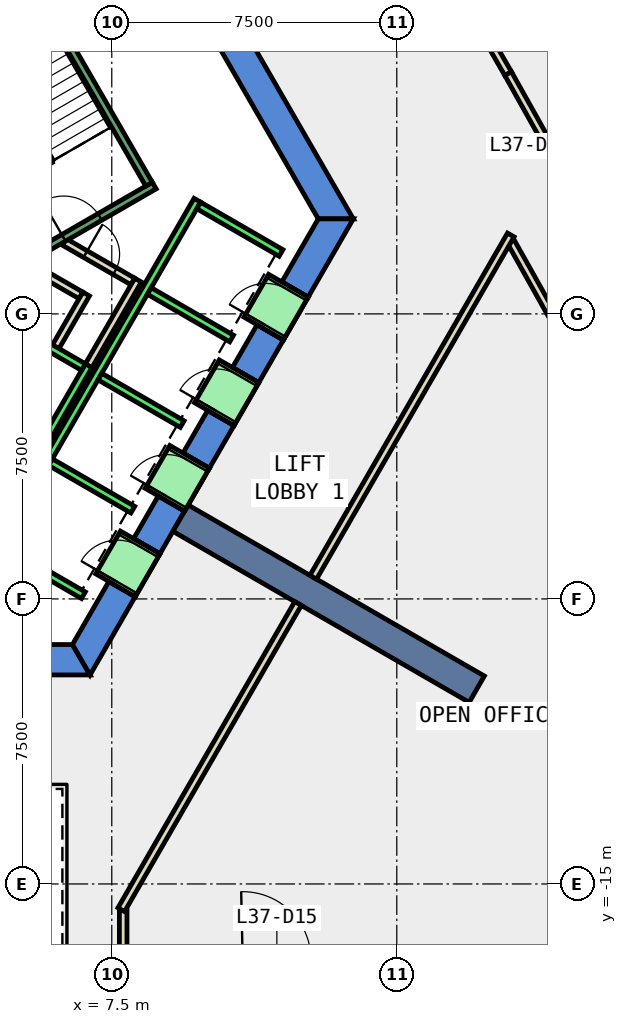
"""IFC4 building model, lengths in metres.
Left out: names, types, materials, properties, quantities, classifications, styles, units other than length and angle.
Written with IfcOpenShell. Run it as: python <this file> out.ifc"""

import sys

from ifc_helpers import new_model, si_unit, direction, frame, frame_2d, origin, place, context, subcontext, project, spatial, polyline, rectangle, outline, extrude, element, fill, save


model = new_model("IFC4")
c1 = context("Model", 3, precision=1e-05, world=origin(), true_north=direction((0.0, 1.0)))
c2 = subcontext(c1, "Body", "Model", "MODEL_VIEW")
j1 = project(units=[si_unit("LENGTHUNIT", "METRE"), si_unit("PLANEANGLEUNIT", "RADIAN")], contexts=[c1])
p1 = place(None, origin())
s1 = spatial("IfcSite", under=j1, at=p1, CompositionType="ELEMENT")
p2 = place(p1, origin())
s2 = spatial("IfcBuilding", under=s1, at=p2, CompositionType="ELEMENT")
p3 = place(p2, frame((0.0, 0.0, 167.6)))
s3 = spatial("IfcBuildingStorey", under=s2, at=p3, CompositionType="ELEMENT", Elevation=167.6)
p4 = place(p3, frame((0.0, 0.0, -0.4)))
e1 = element("IfcWall", 1, at=p4, inside=s3, PredefinedType="SHEAR", context=c2, shape_type="SweptSolid", body=[
    extrude(outline(polyline([(8.517, 11.748), (7.824, 11.348), (12.933, 2.5), (13.856, 2.5), (8.517, 11.748)])), origin(), (0.0, 0.0, 1.0), 4.2),
])
p5 = place(p3, frame((0.0, 0.0, -0.4)))
e2 = element("IfcWall", 2, at=p5, inside=s3, PredefinedType="SHEAR", context=c2, shape_type="SweptSolid", body=[
    extrude(outline(polyline([(5.75, -8.7), (5.75, -9.5), (6.928, -9.5), (6.466, -8.7), (5.75, -8.7)])), origin(), (0.0, 0.0, 1.0), 4.2),
])
p6 = place(p3, frame((0.0, 0.0, -0.4)))
e3 = element("IfcWall", 3, at=p6, inside=s3, PredefinedType="SHEAR", context=c2, shape_type="SweptSolid", body=[
    extrude(outline(polyline([(8.117, -7.44), (7.424, -7.04), (6.466, -8.7), (6.928, -9.5), (8.117, -7.44)])), origin(), (0.0, 0.0, 1.0), 4.2),
])
p7 = place(p3, frame((0.0, 0.0, -0.4)))
e4 = element("IfcWall", 4, at=p7, inside=s3, PredefinedType="SHEAR", context=c2, shape_type="SweptSolid", body=[
    extrude(outline(polyline([(9.417, -5.189), (8.724, -4.789), (8.075, -5.914), (8.767, -6.314), (9.417, -5.189)])), origin(), (0.0, 0.0, 1.0), 4.2),
])
p8 = place(p3, frame((0.0, 0.0, -0.4)))
e5 = element("IfcWall", 5, at=p8, inside=s3, PredefinedType="SHEAR", context=c2, shape_type="SweptSolid", body=[
    extrude(outline(polyline([(10.717, -2.937), (10.025, -2.537), (9.374, -3.663), (10.067, -4.063), (10.717, -2.937)])), origin(), (0.0, 0.0, 1.0), 4.2),
])
p9 = place(p3, frame((0.0, 0.0, -0.4)))
e6 = element("IfcWall", 6, at=p9, inside=s3, PredefinedType="SHEAR", context=c2, shape_type="SweptSolid", body=[
    extrude(outline(polyline([(12.017, -0.686), (11.324, -0.286), (10.675, -1.411), (11.367, -1.811), (12.017, -0.686)])), origin(), (0.0, 0.0, 1.0), 4.2),
])
p10 = place(p3, frame((0.0, 0.0, -0.4)))
e7 = element("IfcWall", 7, at=p10, inside=s3, PredefinedType="SHEAR", context=c2, shape_type="SweptSolid", body=[
    extrude(outline(polyline([(11.974, 0.84), (12.667, 0.44), (13.856, 2.5), (12.933, 2.5), (11.974, 0.84)])), origin(), (0.0, 0.0, 1.0), 4.2),
])
p11 = place(p3, frame((0.0, 0.0, 3.6)))
e8 = element("IfcWall", 8, at=p11, inside=s3, PredefinedType="SHEAR", context=c2, shape_type="SweptSolid", body=[
    extrude(outline(polyline([(8.767, -6.314), (8.075, -5.914), (7.424, -7.04), (8.117, -7.44), (8.767, -6.314)])), origin(), (0.0, 0.0, 1.0), 0.2),
])
p12 = place(p3, frame((0.0, 0.0, 3.6)))
e9 = element("IfcWall", 9, at=p12, inside=s3, PredefinedType="SHEAR", context=c2, shape_type="SweptSolid", body=[
    extrude(outline(polyline([(10.067, -4.063), (9.374, -3.663), (8.724, -4.789), (9.417, -5.189), (10.067, -4.063)])), origin(), (0.0, 0.0, 1.0), 0.2),
])
p13 = place(p3, frame((0.0, 0.0, 3.6)))
e10 = element("IfcWall", 10, at=p13, inside=s3, PredefinedType="SHEAR", context=c2, shape_type="SweptSolid", body=[
    extrude(outline(polyline([(11.367, -1.811), (10.675, -1.411), (10.025, -2.537), (10.717, -2.937), (11.367, -1.811)])), origin(), (0.0, 0.0, 1.0), 0.2),
])
p14 = place(p3, frame((0.0, 0.0, 3.6)))
e11 = element("IfcWall", 11, at=p14, inside=s3, PredefinedType="SHEAR", context=c2, shape_type="SweptSolid", body=[
    extrude(outline(polyline([(12.667, 0.44), (11.974, 0.84), (11.324, -0.286), (12.017, -0.686), (12.667, 0.44)])), origin(), (0.0, 0.0, 1.0), 0.2),
])
p15 = place(p3, frame((9.31, -5.375, -0.4), z_axis=(0.0, 0.0, 1.0), x_axis=(0.866017533419, -0.500013631625, 0.0)))
e12 = element("IfcWall", 12, at=p15, inside=s3, PredefinedType="SHEAR", context=c2, shape_type="SweptSolid", body=[
    extrude(rectangle(XDim=9.0, YDim=0.8, at=frame_2d((4.5, 0.0))), origin(), (0.0, 0.0, 1.0), 4.2),
])
p16 = place(p3, frame((15.987, -16.893, 0.0), z_axis=(0.0, 0.0, 1.0), x_axis=(0.999316060953, 0.036978511606, 0.0)))
e13 = element("IfcWall", 13, at=p16, inside=s3, PredefinedType="PARTITIONING", context=c2, shape_type="SweptSolid", body=[
    extrude(rectangle(XDim=7.355, YDim=0.2, at=frame_2d((3.677, 0.0))), origin(), (0.0, 0.0, 1.0), 3.8),
])
p17 = place(p3, frame((19.506, -0.785, 0.0), z_axis=(0.0, 0.0, 1.0), x_axis=(-0.489049603292, 0.872255974769, 0.0)))
e14 = element("IfcWall", 14, at=p17, inside=s3, PredefinedType="PARTITIONING", context=c2, shape_type="SweptSolid", body=[
    extrude(rectangle(XDim=3.082, YDim=0.2, at=frame_2d((1.541, 0.0))), origin(), (0.0, 0.0, 1.0), 3.8),
])
p18 = place(p3, frame((16.222, 9.28, 0.0), z_axis=(0.0, 0.0, 1.0), x_axis=(0.499920397431, -0.866071357471, 0.0)))
e15 = element("IfcWall", 15, at=p18, inside=s3, PredefinedType="PARTITIONING", context=c2, shape_type="SweptSolid", body=[
    extrude(rectangle(XDim=3.417, YDim=0.2, at=frame_2d((1.708, 0.0))), origin(), (0.0, 0.0, 1.0), 3.8),
])
p19 = place(p3, frame((17.93, 6.321, 0.0), z_axis=(0.0, 0.0, 1.0), x_axis=(0.489044053781, -0.872259086202, 0.0)))
e16 = element("IfcWall", 16, at=p19, inside=s3, PredefinedType="PARTITIONING", context=c2, shape_type="SweptSolid", body=[
    extrude(rectangle(XDim=6.983, YDim=0.2, at=frame_2d((3.492, 0.0))), origin(), (0.0, 0.0, 1.0), 3.8),
])
p20 = place(p19, frame((2.991, 0.0, 0.0)))
e17 = element("IfcOpeningElement", 17, at=p20, cuts=e16, PredefinedType="OPENING", context=c2, shape_type="SweptSolid", body=[
    extrude(rectangle(XDim=1.0, YDim=2.1, at=frame_2d((0.5, 1.05))), frame((0.0, 0.11, 0.0), z_axis=(0.0, -1.0, 0.0), x_axis=(1.0, 0.0, 0.0)), (0.0, 0.0, 1.0), 0.22),
])
p21 = place(p3, frame((5.499, 1.172, 0.0), z_axis=(0.0, 0.0, 1.0), x_axis=(0.866333505267, -0.499465972466, 0.0)))
e18 = element("IfcWall", 18, at=p21, inside=s3, PredefinedType="PARTITIONING", context=c2, shape_type="SweptSolid", body=[
    extrude(rectangle(XDim=1.374, YDim=0.2, at=frame_2d((0.687, 0.0))), origin(), (0.0, 0.0, 1.0), 3.8),
])
p22 = place(p3, frame((6.826, 0.522, 0.0), z_axis=(0.0, 0.0, 1.0), x_axis=(-0.500016722714, -0.866015748706, 0.0)))
e19 = element("IfcWall", 19, at=p22, inside=s3, PredefinedType="PARTITIONING", context=c2, shape_type="SweptSolid", body=[
    extrude(rectangle(XDim=1.7, YDim=0.2, at=frame_2d((0.85, 0.0))), origin(), (0.0, 0.0, 1.0), 3.8),
])
p23 = place(p3, frame((6.25, 1.894, 0.0), z_axis=(0.0, 0.0, 1.0), x_axis=(0.866043184279, -0.499969202016, 0.0)))
e20 = element("IfcWall", 20, at=p23, inside=s3, PredefinedType="PARTITIONING", context=c2, shape_type="SweptSolid", body=[
    extrude(rectangle(XDim=2.084, YDim=0.2, at=frame_2d((1.042, 0.0))), origin(), (0.0, 0.0, 1.0), 3.8),
])
p24 = place(p23, frame((0.642, 0.0, 0.0)))
e21 = element("IfcOpeningElement", 21, at=p24, cuts=e20, PredefinedType="OPENING", context=c2, shape_type="SweptSolid", body=[
    extrude(rectangle(XDim=0.9, YDim=2.1, at=frame_2d((0.45, 1.05))), frame((0.0, 0.11, 0.0), z_axis=(0.0, -1.0, 0.0), x_axis=(1.0, 0.0, 0.0)), (0.0, 0.0, 1.0), 0.22),
])
p25 = place(p3, frame((8.192, 0.888, 0.0), z_axis=(0.0, 0.0, 1.0), x_axis=(-0.499940625693, -0.866059680843, 0.0)))
e22 = element("IfcWall", 22, at=p25, inside=s3, PredefinedType="PARTITIONING", context=c2, shape_type="SweptSolid", body=[
    extrude(rectangle(XDim=2.68, YDim=0.2, at=frame_2d((1.34, 0.0))), origin(), (0.0, 0.0, 1.0), 3.8),
])
p26 = place(p3, frame((7.8, -15.69, 0.0), z_axis=(0.0, 0.0, 1.0), x_axis=(0.0, -1.0, 0.0)))
e23 = element("IfcWall", 23, at=p26, inside=s3, PredefinedType="PARTITIONING", context=c2, shape_type="SweptSolid", body=[
    extrude(rectangle(XDim=1.281, YDim=0.2, at=frame_2d((0.641, 0.0))), origin(), (0.0, 0.0, 1.0), 3.8),
])
p27 = place(p3, frame((18.0, 2.077, 0.0), z_axis=(0.0, 0.0, 1.0), x_axis=(-0.499959557847, -0.866048751813, 0.0)))
e24 = element("IfcWall", 24, at=p27, inside=s3, PredefinedType="PARTITIONING", context=c2, shape_type="SweptSolid", body=[
    extrude(rectangle(XDim=10.399, YDim=0.2, at=frame_2d((5.199, 0.0))), origin(), (0.0, 0.0, 1.0), 3.8),
])
p28 = place(p3, frame((12.401, -7.621, 0.0), z_axis=(0.0, 0.0, 1.0), x_axis=(-0.499983724212, -0.866034800411, 0.0)))
e25 = element("IfcWall", 25, at=p28, inside=s3, PredefinedType="PARTITIONING", context=c2, shape_type="SweptSolid", body=[
    extrude(rectangle(XDim=9.302, YDim=0.2, at=frame_2d((4.651, 0.0))), origin(), (0.0, 0.0, 1.0), 3.8),
])
p29 = place(p3, frame((5.492, -3.788, 0.0), z_axis=(0.0, 0.0, 1.0), x_axis=(0.500011755427, 0.866018616679, 0.0)))
e26 = element("IfcWall", 26, at=p29, inside=s3, PredefinedType="STANDARD", context=c2, shape_type="SweptSolid", body=[
    extrude(rectangle(XDim=2.8, YDim=0.2, at=frame_2d((1.4, 0.0))), origin(), (0.0, 0.0, 1.0), 3.8),
])
p30 = place(p3, frame((4.677, -0.2, 0.0), z_axis=(0.0, 0.0, 1.0), x_axis=(0.865973769406, -0.500089422704, 0.0)))
e27 = element("IfcWall", 27, at=p30, inside=s3, PredefinedType="STANDARD", context=c2, shape_type="SweptSolid", body=[
    extrude(rectangle(XDim=2.399, YDim=0.2, at=frame_2d((1.2, 0.0))), origin(), (0.0, 0.0, 1.0), 3.8),
])
p31 = place(p3, frame((4.451, -6.19, 0.0), z_axis=(0.0, 0.0, 1.0), x_axis=(0.50000090737, 0.866024879913, 0.0)))
e28 = element("IfcWall", 28, at=p31, inside=s3, PredefinedType="STANDARD", context=c2, shape_type="SweptSolid", body=[
    extrude(rectangle(XDim=10.6, YDim=0.2, at=frame_2d((5.3, 0.0))), origin(), (0.0, 0.0, 1.0), 3.8),
])
for number, where, z_axis, x_axis in (
    (29, (4.588, -6.153, 0.0), (0.0, 0.0, 1.0), (0.866, -0.5, 0.0)),
    (30, (5.888, -3.902, 0.0), (0.0, 0.0, 1.0), (0.866, -0.5, 0.0)),
    (31, (7.188, -1.65, 0.0), (0.0, 0.0, 1.0), (0.866, -0.5, 0.0)),
    (32, (8.488, 0.602, 0.0), (0.0, 0.0, 1.0), (0.866, -0.5, 0.0)),
):
    element("IfcWall", number, at=place(p3, frame(where, z_axis=z_axis, x_axis=x_axis)), inside=s3, PredefinedType="STANDARD", context=c2, shape_type="SweptSolid", body=[
        extrude(rectangle(XDim=2.5, YDim=0.2, at=frame_2d((1.25, 0.0))), origin(), (0.0, 0.0, 1.0), 3.8),
    ])
p32 = place(p3, frame((9.788, 2.853, 0.0), z_axis=(0.0, 0.0, 1.0), x_axis=(0.865998541277, -0.500046524342, 0.0)))
e33 = element("IfcWall", 33, at=p32, inside=s3, PredefinedType="STANDARD", context=c2, shape_type="SweptSolid", body=[
    extrude(rectangle(XDim=2.5, YDim=0.2, at=frame_2d((1.25, 0.0))), origin(), (0.0, 0.0, 1.0), 3.8),
])
p33 = place(p3, frame((7.598, -7.14, 0.0), z_axis=(0.0, 0.0, 1.0), x_axis=(0.500362116554, 0.865816234728, 0.0)))
e34 = element("IfcWall", 34, at=p33, inside=s3, PredefinedType="STANDARD", context=c2, shape_type="SweptSolid", body=[
    extrude(rectangle(XDim=1.299, YDim=1.2, at=frame_2d((0.65, 0.0))), origin(), (0.0, 0.0, 1.0), 2.4),
])
p34 = place(p33, frame((0.1, 0.0, 0.0)))
e35 = element("IfcOpeningElement", 35, at=p34, cuts=e34, PredefinedType="OPENING", context=c2, shape_type="SweptSolid", body=[
    extrude(rectangle(XDim=1.1, YDim=2.3, at=frame_2d((0.55, 1.15))), frame((0.0, 0.61, 0.0), z_axis=(0.0, -1.0, 0.0), x_axis=(1.0, 0.0, 0.0)), (0.0, 0.0, 1.0), 1.22),
])
p35 = place(p3, frame((8.898, -4.889, 0.0), z_axis=(0.0, 0.0, 1.0), x_axis=(0.500036693733, 0.866004217611, 0.0)))
e36 = element("IfcWall", 36, at=p35, inside=s3, PredefinedType="STANDARD", context=c2, shape_type="SweptSolid", body=[
    extrude(rectangle(XDim=1.3, YDim=1.2, at=frame_2d((0.65, 0.0))), origin(), (0.0, 0.0, 1.0), 2.4),
])
p36 = place(p35, frame((0.1, 0.0, 0.0)))
e37 = element("IfcOpeningElement", 37, at=p36, cuts=e36, PredefinedType="OPENING", context=c2, shape_type="SweptSolid", body=[
    extrude(rectangle(XDim=1.1, YDim=2.3, at=frame_2d((0.55, 1.15))), frame((0.0, 0.61, 0.0), z_axis=(0.0, -1.0, 0.0), x_axis=(1.0, 0.0, 0.0)), (0.0, 0.0, 1.0), 1.22),
])
p37 = place(p3, frame((10.198, -2.637, 0.0), z_axis=(0.0, 0.0, 1.0), x_axis=(0.49989585183, 0.866085525409, 0.0)))
e38 = element("IfcWall", 38, at=p37, inside=s3, PredefinedType="STANDARD", context=c2, shape_type="SweptSolid", body=[
    extrude(rectangle(XDim=1.3, YDim=1.2, at=frame_2d((0.65, 0.0))), origin(), (0.0, 0.0, 1.0), 2.4),
])
p38 = place(p37, frame((0.1, 0.0, 0.0)))
e39 = element("IfcOpeningElement", 39, at=p38, cuts=e38, PredefinedType="OPENING", context=c2, shape_type="SweptSolid", body=[
    extrude(rectangle(XDim=1.1, YDim=2.3, at=frame_2d((0.55, 1.15))), frame((0.0, 0.61, 0.0), z_axis=(0.0, -1.0, 0.0), x_axis=(1.0, 0.0, 0.0)), (0.0, 0.0, 1.0), 1.22),
])
p39 = place(p3, frame((11.498, -0.385, 0.0), z_axis=(0.0, 0.0, 1.0), x_axis=(0.500221244143, 0.865897630733, 0.0)))
e40 = element("IfcWall", 40, at=p39, inside=s3, PredefinedType="STANDARD", context=c2, shape_type="SweptSolid", body=[
    extrude(rectangle(XDim=1.299, YDim=1.2, at=frame_2d((0.65, 0.0))), origin(), (0.0, 0.0, 1.0), 2.4),
])
p40 = place(p39, frame((0.1, 0.0, 0.0)))
e41 = element("IfcOpeningElement", 41, at=p40, cuts=e40, PredefinedType="OPENING", context=c2, shape_type="SweptSolid", body=[
    extrude(rectangle(XDim=1.1, YDim=2.3, at=frame_2d((0.55, 1.15))), frame((0.0, 0.61, 0.0), z_axis=(0.0, -1.0, 0.0), x_axis=(1.0, 0.0, 0.0)), (0.0, 0.0, 1.0), 1.22),
])
p41 = place(p3, frame((4.806, 1.176, 0.0), z_axis=(0.0, 0.0, 1.0), x_axis=(0.866059941101, 0.499940174841, 0.0)))
e42 = element("IfcWall", 42, at=p41, inside=s3, PredefinedType="STANDARD", context=c2, shape_type="SweptSolid", body=[
    extrude(rectangle(XDim=4.4, YDim=0.2, at=frame_2d((2.2, 0.0))), origin(), (0.0, 0.0, 1.0), 3.8),
])
p42 = place(p41, frame((1.65, 0.0, 0.0)))
e43 = element("IfcOpeningElement", 43, at=p42, cuts=e42, PredefinedType="OPENING", context=c2, shape_type="SweptSolid", body=[
    extrude(rectangle(XDim=1.1, YDim=2.2, at=frame_2d((0.55, 1.1))), frame((0.0, 0.11, 0.0), z_axis=(0.0, -1.0, 0.0), x_axis=(1.0, 0.0, 0.0)), (0.0, 0.0, 1.0), 0.22),
])
p43 = place(p3, frame((8.48, 3.412, 0.0), z_axis=(0.0, 0.0, 1.0), x_axis=(-0.499978703459, 0.866037698999, 0.0)))
e44 = element("IfcWall", 44, at=p43, inside=s3, PredefinedType="STANDARD", context=c2, shape_type="SweptSolid", body=[
    extrude(rectangle(XDim=6.9, YDim=0.2, at=frame_2d((3.45, 0.0))), origin(), (0.0, 0.0, 1.0), 3.8),
])
p44 = place(p24, origin())
e45 = element("IfcDoor", 45, at=p44, inside=s3, OperationType="SINGLE_SWING_LEFT", PredefinedType="DOOR", context=c2, shape_type="SweptSolid", body=[
    extrude(rectangle(XDim=0.9, YDim=2.1, at=frame_2d((0.45, 1.05))), frame((0.0, 0.025, 0.0), z_axis=(0.0, -1.0, 0.0), x_axis=(1.0, 0.0, 0.0)), (0.0, 0.0, 1.0), 0.05),
])
fill(e21, e45)
p45 = place(p34, origin())
e46 = element("IfcDoor", 46, at=p45, inside=s3, OperationType="SLIDING_TO_LEFT", PredefinedType="DOOR", context=c2, shape_type="SweptSolid", body=[
    extrude(rectangle(XDim=1.1, YDim=2.3, at=frame_2d((0.55, 1.15))), frame((0.0, 0.025, 0.0), z_axis=(0.0, -1.0, 0.0), x_axis=(1.0, 0.0, 0.0)), (0.0, 0.0, 1.0), 0.05),
])
fill(e35, e46)
p46 = place(p36, origin())
e47 = element("IfcDoor", 47, at=p46, inside=s3, OperationType="SLIDING_TO_LEFT", PredefinedType="DOOR", context=c2, shape_type="SweptSolid", body=[
    extrude(rectangle(XDim=1.1, YDim=2.3, at=frame_2d((0.55, 1.15))), frame((0.0, 0.025, 0.0), z_axis=(0.0, -1.0, 0.0), x_axis=(1.0, 0.0, 0.0)), (0.0, 0.0, 1.0), 0.05),
])
fill(e37, e47)
p47 = place(p38, origin())
e48 = element("IfcDoor", 48, at=p47, inside=s3, OperationType="SLIDING_TO_LEFT", PredefinedType="DOOR", context=c2, shape_type="SweptSolid", body=[
    extrude(rectangle(XDim=1.1, YDim=2.3, at=frame_2d((0.55, 1.15))), frame((0.0, 0.025, 0.0), z_axis=(0.0, -1.0, 0.0), x_axis=(1.0, 0.0, 0.0)), (0.0, 0.0, 1.0), 0.05),
])
fill(e39, e48)
p48 = place(p40, origin())
e49 = element("IfcDoor", 49, at=p48, inside=s3, OperationType="SLIDING_TO_LEFT", PredefinedType="DOOR", context=c2, shape_type="SweptSolid", body=[
    extrude(rectangle(XDim=1.1, YDim=2.3, at=frame_2d((0.55, 1.15))), frame((0.0, 0.025, 0.0), z_axis=(0.0, -1.0, 0.0), x_axis=(1.0, 0.0, 0.0)), (0.0, 0.0, 1.0), 0.05),
])
fill(e41, e49)
p49 = place(p42, origin())
e50 = element("IfcDoor", 50, at=p49, inside=s3, OperationType="SINGLE_SWING_LEFT", PredefinedType="DOOR", context=c2, shape_type="SweptSolid", body=[
    extrude(rectangle(XDim=1.1, YDim=2.2, at=frame_2d((0.55, 1.1))), frame((0.0, 0.025, 0.0), z_axis=(0.0, -1.0, 0.0), x_axis=(1.0, 0.0, 0.0)), (0.0, 0.0, 1.0), 0.05),
])
fill(e43, e50)
save(model, sys.argv[1])
